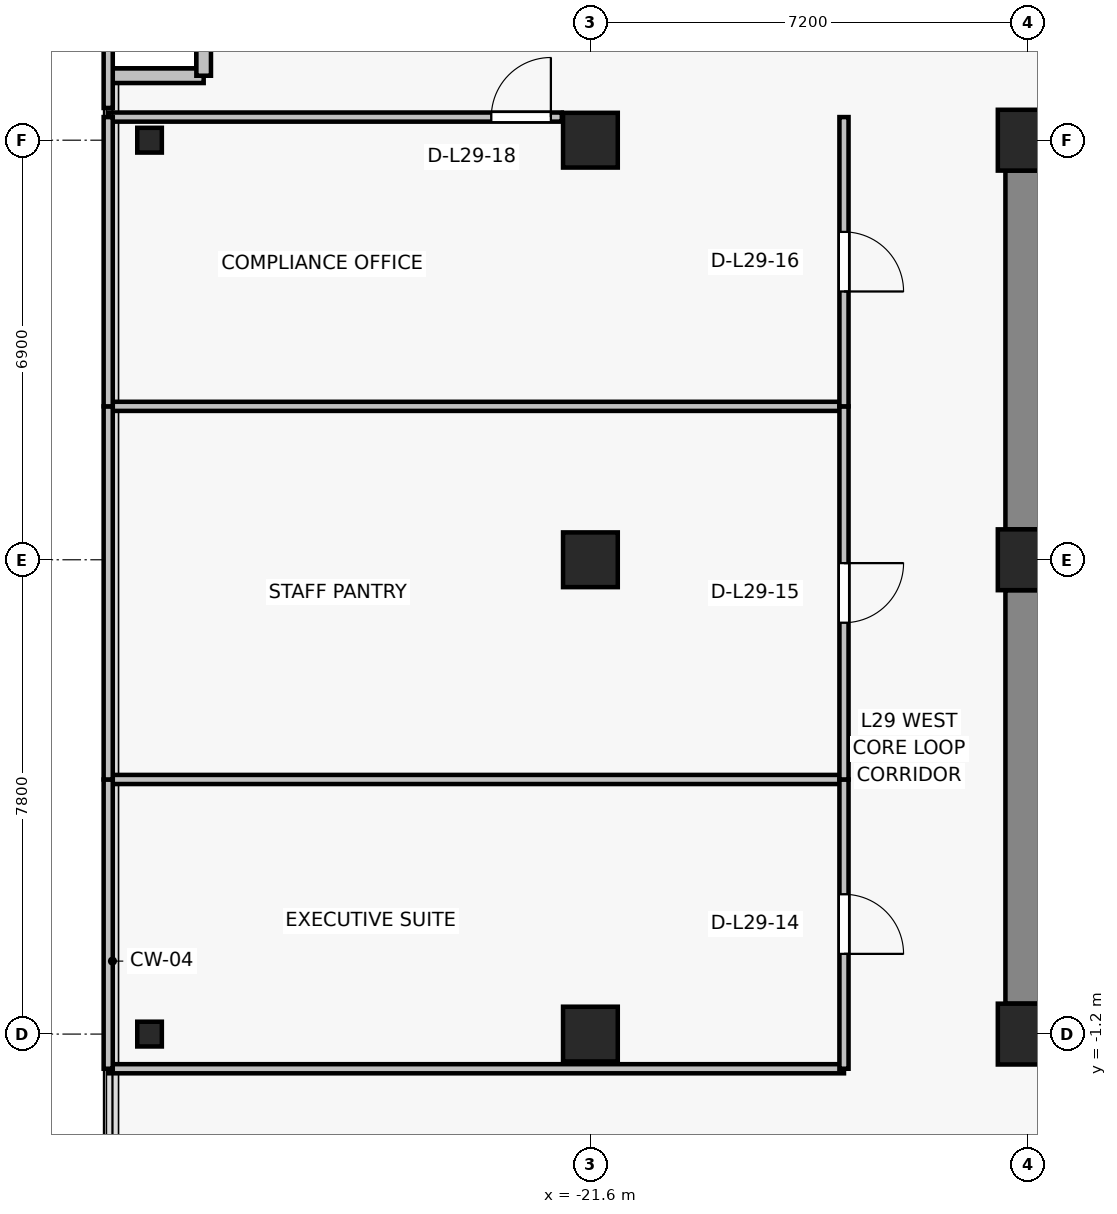
"""IFC4 building model, lengths in metres.
Left out: names, types, materials, properties, quantities, classifications, styles, units other than length and angle.
Written with IfcOpenShell. Run it as: python <this file> out.ifc"""

import sys

from ifc_helpers import new_model, si_unit, direction, frame, frame_2d, origin, origin_2d, place, context, subcontext, project, spatial, rectangle, i_section, extrude, source, transform, mapped, element, fill, save


model = new_model("IFC4")
c1 = context("Model", 3, precision=1e-05, world=origin(), true_north=direction((0.0, 1.0)))
c2 = subcontext(c1, "Body", "Model", "MODEL_VIEW")
j1 = project(units=[si_unit("LENGTHUNIT", "METRE"), si_unit("PLANEANGLEUNIT", "RADIAN")], contexts=[c1])
p1 = place(None, origin())
s1 = spatial("IfcSite", under=j1, at=p1, CompositionType="ELEMENT")
p2 = place(p1, origin())
s2 = spatial("IfcBuilding", under=s1, at=p2, CompositionType="ELEMENT")
p3 = place(p2, frame((0.0, 0.0, 106.6)))
s3 = spatial("IfcBuildingStorey", under=s2, at=p3, CompositionType="ELEMENT", Elevation=106.6)
for number, where, z_axis, x_axis in (
    (1, (-14.4, -1.2, 0.0), (0.0, 0.0, 1.0), (1.0, 0.0, 0.0)),
    (2, (-14.4, 6.6, 0.0), (0.0, 0.0, 1.0), (1.0, 0.0, 0.0)),
    (3, (-14.4, 13.5, 0.0), (0.0, 0.0, 1.0), (1.0, 0.0, 0.0)),
):
    element("IfcColumn", number, at=place(p3, frame(where, z_axis=z_axis, x_axis=x_axis)), inside=s3, PredefinedType="COLUMN", context=c2, shape_type="SweptSolid", body=[
        extrude(rectangle(XDim=1.0, YDim=1.0, at=origin_2d()), origin(), (0.0, 0.0, 1.0), 3.3),
    ])
for number, where, z_axis, x_axis in (
    (4, (-21.6, -1.2, 0.0), (0.0, 0.0, 1.0), (1.0, 0.0, 0.0)),
    (5, (-21.6, 6.6, 0.0), (0.0, 0.0, 1.0), (1.0, 0.0, 0.0)),
    (6, (-21.6, 13.5, 0.0), (0.0, 0.0, 1.0), (1.0, 0.0, 0.0)),
):
    element("IfcColumn", number, at=place(p3, frame(where, z_axis=z_axis, x_axis=x_axis)), inside=s3, PredefinedType="COLUMN", context=c2, shape_type="SweptSolid", body=[
        extrude(rectangle(XDim=0.9, YDim=0.9, at=origin_2d()), origin(), (0.0, 0.0, 1.0), 3.3),
    ])
for number, where, z_axis, x_axis in (
    (7, (-28.85, -1.2, 0.0), (0.0, 0.0, 1.0), (1.0, 0.0, 0.0)),
    (8, (-28.85, 13.5, 0.0), (0.0, 0.0, 1.0), (1.0, 0.0, 0.0)),
):
    element("IfcColumn", number, at=place(p3, frame(where, z_axis=z_axis, x_axis=x_axis)), inside=s3, PredefinedType="COLUMN", context=c2, shape_type="SweptSolid", body=[
        extrude(i_section(OverallWidth=0.404, OverallDepth=0.407, WebThickness=0.022, FlangeThickness=0.032, FilletRadius=0.015, at=origin_2d()), origin(), (0.0, 0.0, 1.0), 3.3),
    ])
p4 = place(p3, frame((-14.4, -0.7, 0.0), z_axis=(0.0, 0.0, 1.0), x_axis=(0.0, 1.0, 0.0)))
e9 = element("IfcWall", 9, at=p4, inside=s3, PredefinedType="SHEAR", context=c2, shape_type="SweptSolid", body=[
    extrude(rectangle(XDim=6.8, YDim=0.75, at=frame_2d((3.4, 0.0))), origin(), (0.0, 0.0, 1.0), 3.075),
])
p5 = place(p3, frame((-14.4, 7.1, 0.0), z_axis=(0.0, 0.0, 1.0), x_axis=(0.0, 1.0, 0.0)))
e10 = element("IfcWall", 10, at=p5, inside=s3, PredefinedType="SHEAR", context=c2, shape_type="SweptSolid", body=[
    extrude(rectangle(XDim=5.9, YDim=0.75, at=frame_2d((2.95, 0.0))), origin(), (0.0, 0.0, 1.0), 3.075),
])
for number, where, z_axis, x_axis in (
    (11, (-27.96, 14.56, 0.0), (0.0, 0.0, 1.0), (-1.0, 0.0, 0.0)),
    (12, (-27.96, 16.06, 0.0), (0.0, 0.0, 1.0), (0.0, -1.0, 0.0)),
):
    element("IfcWall", number, at=place(p3, frame(where, z_axis=z_axis, x_axis=x_axis)), inside=s3, PredefinedType="SOLIDWALL", context=c2, shape_type="SweptSolid", body=[
        extrude(rectangle(XDim=1.5, YDim=0.24, at=frame_2d((0.75, 0.0))), origin(), (0.0, 0.0, 1.0), 3.075),
    ])
for number, where, z_axis, x_axis in (
    (13, (-17.43, -1.77, 0.0), (0.0, 0.0, 1.0), (-1.0, 0.0, 0.0)),
    (14, (-29.53, 2.987, 0.0), (0.0, 0.0, 1.0), (1.0, 0.0, 0.0)),
):
    element("IfcWall", number, at=place(p3, frame(where, z_axis=z_axis, x_axis=x_axis)), inside=s3, PredefinedType="PARTITIONING", context=c2, shape_type="SweptSolid", body=[
        extrude(rectangle(XDim=12.1, YDim=0.15, at=frame_2d((6.05, 0.0))), origin(), (0.0, 0.0, 1.0), 2.515),
    ])
p6 = place(p3, frame((-29.53, -1.77, 0.0), z_axis=(0.0, 0.0, 1.0), x_axis=(0.0, 1.0, 0.0)))
e15 = element("IfcWall", 15, at=p6, inside=s3, PredefinedType="PARTITIONING", context=c2, shape_type="SweptSolid", body=[
    extrude(rectangle(XDim=4.757, YDim=0.15, at=frame_2d((2.378, 0.0))), origin(), (0.0, 0.0, 1.0), 3.075),
])
p7 = place(p3, frame((-17.43, 2.987, 0.0), z_axis=(0.0, 0.0, 1.0), x_axis=(0.0, -1.0, 0.0)))
e16 = element("IfcWall", 16, at=p7, inside=s3, PredefinedType="PARTITIONING", context=c2, shape_type="SweptSolid", body=[
    extrude(rectangle(XDim=4.757, YDim=0.15, at=frame_2d((2.378, 0.0))), origin(), (0.0, 0.0, 1.0), 2.515),
])
p8 = place(p7, frame((1.888, 0.0, 0.0)))
e17 = element("IfcOpeningElement", 17, at=p8, cuts=e16, PredefinedType="OPENING", context=c2, shape_type="SweptSolid", body=[
    extrude(rectangle(XDim=0.98, YDim=2.15, at=frame_2d((0.49, 1.075))), frame((0.0, 0.085, 0.0), z_axis=(0.0, -1.0, 0.0), x_axis=(1.0, 0.0, 0.0)), (0.0, 0.0, 1.0), 0.17),
])
p9 = place(p3, frame((-29.53, 9.123, 0.0), z_axis=(0.0, 0.0, 1.0), x_axis=(1.0, 0.0, 0.0)))
e18 = element("IfcWall", 18, at=p9, inside=s3, PredefinedType="PARTITIONING", context=c2, shape_type="SweptSolid", body=[
    extrude(rectangle(XDim=12.1, YDim=0.15, at=frame_2d((6.05, 0.0))), origin(), (0.0, 0.0, 1.0), 2.515),
])
p10 = place(p3, frame((-29.53, 2.987, 0.0), z_axis=(0.0, 0.0, 1.0), x_axis=(0.0, 1.0, 0.0)))
e19 = element("IfcWall", 19, at=p10, inside=s3, PredefinedType="PARTITIONING", context=c2, shape_type="SweptSolid", body=[
    extrude(rectangle(XDim=6.136, YDim=0.15, at=frame_2d((3.068, 0.0))), origin(), (0.0, 0.0, 1.0), 3.075),
])
p11 = place(p3, frame((-17.43, 9.123, 0.0), z_axis=(0.0, 0.0, 1.0), x_axis=(0.0, -1.0, 0.0)))
e20 = element("IfcWall", 20, at=p11, inside=s3, PredefinedType="PARTITIONING", context=c2, shape_type="SweptSolid", body=[
    extrude(rectangle(XDim=6.136, YDim=0.15, at=frame_2d((3.068, 0.0))), origin(), (0.0, 0.0, 1.0), 2.515),
])
p12 = place(p11, frame((2.578, 0.0, 0.0)))
e21 = element("IfcOpeningElement", 21, at=p12, cuts=e20, PredefinedType="OPENING", context=c2, shape_type="SweptSolid", body=[
    extrude(rectangle(XDim=0.98, YDim=2.15, at=frame_2d((0.49, 1.075))), frame((0.0, 0.085, 0.0), z_axis=(0.0, -1.0, 0.0), x_axis=(1.0, 0.0, 0.0)), (0.0, 0.0, 1.0), 0.17),
])
p13 = place(p3, frame((-29.53, 13.88, 0.0), z_axis=(0.0, 0.0, 1.0), x_axis=(1.0, 0.0, 0.0)))
e22 = element("IfcWall", 22, at=p13, inside=s3, PredefinedType="PARTITIONING", context=c2, shape_type="SweptSolid", body=[
    extrude(rectangle(XDim=7.46, YDim=0.15, at=frame_2d((3.73, 0.0))), origin(), (0.0, 0.0, 1.0), 3.075),
])
p14 = place(p13, frame((6.3, 0.0, 0.0)))
e23 = element("IfcOpeningElement", 23, at=p14, cuts=e22, PredefinedType="OPENING", context=c2, shape_type="SweptSolid", body=[
    extrude(rectangle(XDim=0.98, YDim=2.15, at=frame_2d((0.49, 1.075))), frame((0.0, 0.085, 0.0), z_axis=(0.0, -1.0, 0.0), x_axis=(1.0, 0.0, 0.0)), (0.0, 0.0, 1.0), 0.17),
])
p15 = place(p3, frame((-29.53, 9.123, 0.0), z_axis=(0.0, 0.0, 1.0), x_axis=(0.0, 1.0, 0.0)))
e24 = element("IfcWall", 24, at=p15, inside=s3, PredefinedType="PARTITIONING", context=c2, shape_type="SweptSolid", body=[
    extrude(rectangle(XDim=4.757, YDim=0.15, at=frame_2d((2.378, 0.0))), origin(), (0.0, 0.0, 1.0), 3.075),
])
p16 = place(p3, frame((-17.43, 13.88, 0.0), z_axis=(0.0, 0.0, 1.0), x_axis=(0.0, -1.0, 0.0)))
e25 = element("IfcWall", 25, at=p16, inside=s3, PredefinedType="PARTITIONING", context=c2, shape_type="SweptSolid", body=[
    extrude(rectangle(XDim=4.757, YDim=0.15, at=frame_2d((2.378, 0.0))), origin(), (0.0, 0.0, 1.0), 2.515),
])
p17 = place(p16, frame((1.888, 0.0, 0.0)))
e26 = element("IfcOpeningElement", 26, at=p17, cuts=e25, PredefinedType="OPENING", context=c2, shape_type="SweptSolid", body=[
    extrude(rectangle(XDim=0.98, YDim=2.15, at=frame_2d((0.49, 1.075))), frame((0.0, 0.085, 0.0), z_axis=(0.0, -1.0, 0.0), x_axis=(1.0, 0.0, 0.0)), (0.0, 0.0, 1.0), 0.17),
])
p18 = place(p3, frame((-29.53, 14.03, 0.0), z_axis=(0.0, 0.0, 1.0), x_axis=(0.0, 1.0, 0.0)))
e27 = element("IfcWall", 27, at=p18, inside=s3, PredefinedType="PARTITIONING", context=c2, shape_type="SweptSolid", body=[
    extrude(rectangle(XDim=3.6, YDim=0.15, at=frame_2d((1.8, 0.0))), origin(), (0.0, 0.0, 1.0), 3.075),
])
m1 = source(origin(), c2, "Body", "SweptSolid", [
    extrude(rectangle(XDim=0.98, YDim=2.15, at=frame_2d((0.49, 1.075))), frame((0.0, 0.025, 0.0), z_axis=(0.0, -1.0, 0.0), x_axis=(1.0, 0.0, 0.0)), (0.0, 0.0, 1.0), 0.05),
])
p19 = place(p8, origin())
e28 = element("IfcDoor", 28, at=p19, inside=s3, OperationType="SINGLE_SWING_RIGHT", PredefinedType="DOOR", context=c2, shape_type="MappedRepresentation", body=[
    mapped(m1, transform((0.0, 0.0, 0.0), x_axis=(1.0, 0.0, 0.0), y_axis=(0.0, 1.0, 0.0), z_axis=(0.0, 0.0, 1.0), scale=1.0)),
])
fill(e17, e28)
p20 = place(p12, origin())
e29 = element("IfcDoor", 29, at=p20, inside=s3, OperationType="SINGLE_SWING_LEFT", PredefinedType="DOOR", context=c2, shape_type="MappedRepresentation", body=[
    mapped(m1, transform((0.0, 0.0, 0.0), x_axis=(1.0, 0.0, 0.0), y_axis=(0.0, 1.0, 0.0), z_axis=(0.0, 0.0, 1.0), scale=1.0)),
])
fill(e21, e29)
p21 = place(p17, origin())
e30 = element("IfcDoor", 30, at=p21, inside=s3, OperationType="SINGLE_SWING_RIGHT", PredefinedType="DOOR", context=c2, shape_type="MappedRepresentation", body=[
    mapped(m1, transform((0.0, 0.0, 0.0), x_axis=(1.0, 0.0, 0.0), y_axis=(0.0, 1.0, 0.0), z_axis=(0.0, 0.0, 1.0), scale=1.0)),
])
fill(e26, e30)
p22 = place(p14, origin())
e31 = element("IfcDoor", 31, at=p22, inside=s3, OperationType="SINGLE_SWING_RIGHT", PredefinedType="DOOR", context=c2, shape_type="MappedRepresentation", body=[
    mapped(m1, transform((0.0, 0.0, 0.0), x_axis=(1.0, 0.0, 0.0), y_axis=(0.0, 1.0, 0.0), z_axis=(0.0, 0.0, 1.0), scale=1.0)),
])
fill(e23, e31)
save(model, sys.argv[1])
